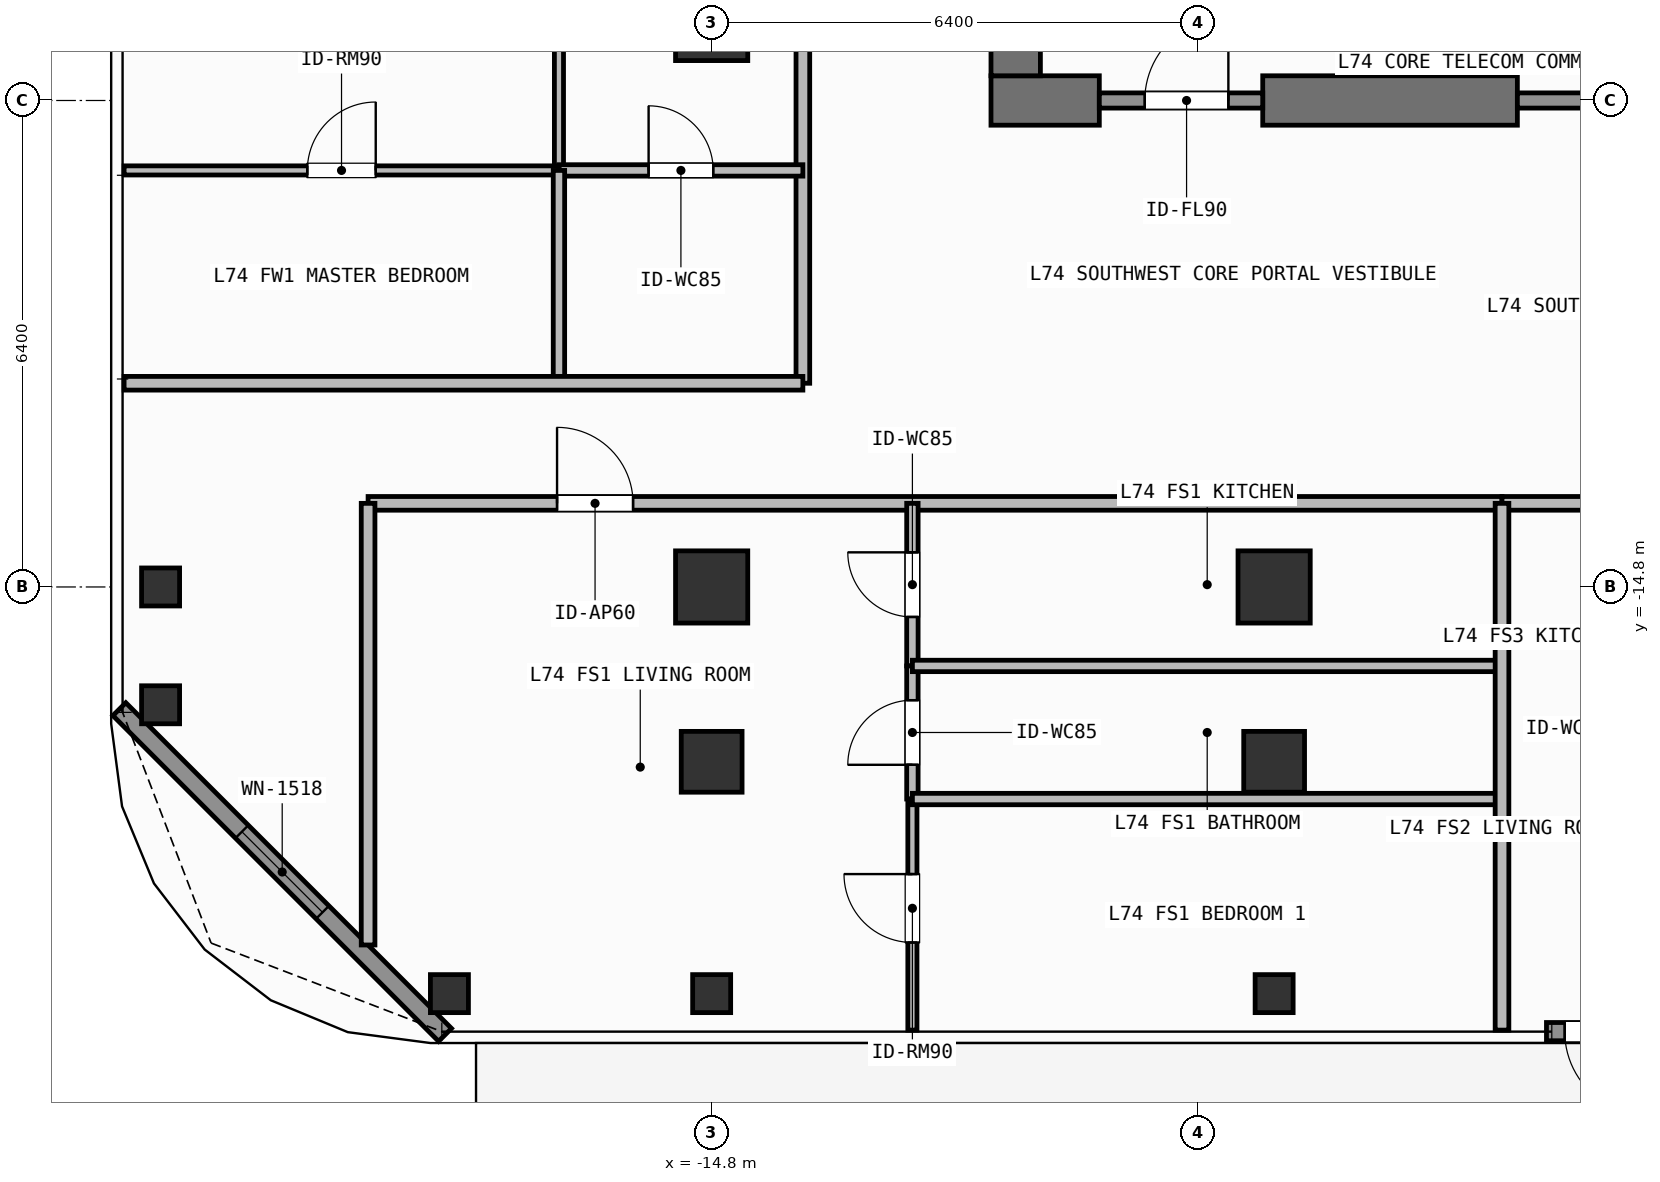
"""IFC4 building model, lengths in metres.
Left out: names, types, materials, properties, quantities, classifications, styles, units other than length and angle.
Written with IfcOpenShell. Run it as: python <this file> out.ifc"""

import sys

from ifc_helpers import new_model, si_unit, direction, frame, frame_2d, origin, origin_2d, place, context, subcontext, project, spatial, rectangle, hollow_rectangle, extrude, element, fill, save


model = new_model("IFC4")
c1 = context("Model", 3, precision=1e-05, world=origin(), true_north=direction((0.0, 1.0)))
c2 = subcontext(c1, "Body", "Model", "MODEL_VIEW")
j1 = project(units=[si_unit("LENGTHUNIT", "METRE"), si_unit("PLANEANGLEUNIT", "RADIAN")], contexts=[c1])
p1 = place(None, origin())
s1 = spatial("IfcSite", under=j1, at=p1, CompositionType="ELEMENT")
p2 = place(p1, origin())
s2 = spatial("IfcBuilding", under=s1, at=p2, CompositionType="ELEMENT")
p3 = place(p2, frame((0.0, 0.0, 301.5)))
s3 = spatial("IfcBuildingStorey", under=s2, at=p3, CompositionType="ELEMENT", Elevation=301.5)
p4 = place(p3, frame((-11.125, -8.4, 0.0), z_axis=(0.0, 0.0, 1.0), x_axis=(1.0, 0.0, 0.0)))
e1 = element("IfcWall", 1, at=p4, inside=s3, PredefinedType="SHEAR", context=c2, shape_type="SweptSolid", body=[
    extrude(rectangle(XDim=1.425, YDim=0.65, at=frame_2d((0.712, 0.0))), origin(), (0.0, 0.0, 1.0), 3.9),
])
p5 = place(p3, frame((-7.55, -8.4, 0.0), z_axis=(0.0, 0.0, 1.0), x_axis=(1.0, 0.0, 0.0)))
e2 = element("IfcWall", 2, at=p5, inside=s3, PredefinedType="SHEAR", context=c2, shape_type="SweptSolid", body=[
    extrude(rectangle(XDim=3.35, YDim=0.65, at=frame_2d((1.675, 0.0))), origin(), (0.0, 0.0, 1.0), 3.9),
])
p6 = place(p3, frame((-10.8, -8.075, 0.0), z_axis=(0.0, 0.0, 1.0), x_axis=(0.0, 1.0, 0.0)))
e3 = element("IfcWall", 3, at=p6, inside=s3, PredefinedType="SHEAR", context=c2, shape_type="SweptSolid", body=[
    extrude(rectangle(XDim=16.15, YDim=0.65, at=frame_2d((8.075, 0.0))), origin(), (0.0, 0.0, 1.0), 3.9),
])
for number, where, z_axis, x_axis in (
    (4, (-14.8, -14.8, 0.0), (0.0, 0.0, 1.0), (1.0, 0.0, 0.0)),
    (5, (-7.4, -14.8, 0.0), (0.0, 0.0, 1.0), (1.0, 0.0, 0.0)),
    (6, (-14.8, -7.4, 0.0), (0.0, 0.0, 1.0), (1.0, 0.0, 0.0)),
):
    element("IfcColumn", number, at=place(p3, frame(where, z_axis=z_axis, x_axis=x_axis)), inside=s3, PredefinedType="COLUMN", context=c2, shape_type="SweptSolid", body=[
        extrude(rectangle(XDim=0.95, YDim=0.95, at=origin_2d()), origin(), (0.0, 0.0, 1.0), 3.9),
    ])
for number, where, z_axis, x_axis in (
    (7, (-14.8, -17.1, 0.0), (0.0, 0.0, 1.0), (1.0, 0.0, 0.0)),
    (8, (-7.4, -17.1, 0.0), (0.0, 0.0, 1.0), (1.0, 0.0, 0.0)),
):
    element("IfcColumn", number, at=place(p3, frame(where, z_axis=z_axis, x_axis=x_axis)), inside=s3, PredefinedType="COLUMN", context=c2, shape_type="SweptSolid", body=[
        extrude(hollow_rectangle(XDim=0.8, YDim=0.8, WallThickness=0.036, at=origin_2d()), origin(), (0.0, 0.0, 1.0), 3.9),
    ])
for number, where, z_axis, x_axis in (
    (9, (-18.25, -20.15, 0.0), (0.0, 0.0, 1.0), (1.0, 0.0, 0.0)),
    (10, (-22.05, -16.35, 0.0), (0.0, 0.0, 1.0), (1.0, 0.0, 0.0)),
    (11, (-14.8, -20.15, 0.0), (0.0, 0.0, 1.0), (1.0, 0.0, 0.0)),
    (12, (-7.4, -20.15, 0.0), (0.0, 0.0, 1.0), (1.0, 0.0, 0.0)),
    (13, (-22.05, -14.8, 0.0), (0.0, 0.0, 1.0), (1.0, 0.0, 0.0)),
):
    element("IfcColumn", number, at=place(p3, frame(where, z_axis=z_axis, x_axis=x_axis)), inside=s3, PredefinedType="COLUMN", context=c2, shape_type="SweptSolid", body=[
        extrude(hollow_rectangle(XDim=0.5, YDim=0.5, WallThickness=0.025, at=origin_2d()), origin(), (0.0, 0.0, 1.0), 3.9),
    ])
p7 = place(p3, frame((-2.237, -20.65, 0.0), z_axis=(0.0, 0.0, 1.0), x_axis=(-1.0, 0.0, 0.0)))
e14 = element("IfcWall", 14, at=p7, inside=s3, PredefinedType="SOLIDWALL", context=c2, shape_type="SweptSolid", body=[
    extrude(rectangle(XDim=1.58, YDim=0.24, at=frame_2d((0.79, 0.0))), origin(), (0.0, 0.0, 1.0), 3.68),
])
p8 = place(p7, frame((0.24, 0.0, 0.0)))
e15 = element("IfcOpeningElement", 15, at=p8, cuts=e14, PredefinedType="OPENING", context=c2, shape_type="SweptSolid", body=[
    extrude(rectangle(XDim=1.1, YDim=2.2, at=frame_2d((0.55, 1.1))), frame((0.0, 0.13, 0.0), z_axis=(0.0, -1.0, 0.0), x_axis=(1.0, 0.0, 0.0)), (0.0, 0.0, 1.0), 0.26),
])
p9 = place(p3, frame((-18.308, -20.692, 0.0), z_axis=(0.0, 0.0, 1.0), x_axis=(-0.707106781187, 0.707106781187, 0.0)))
e16 = element("IfcWall", 16, at=p9, inside=s3, PredefinedType="SOLIDWALL", context=c2, shape_type="SweptSolid", body=[
    extrude(rectangle(XDim=6.059, YDim=0.24, at=frame_2d((3.03, 0.0))), origin(), (0.0, 0.0, 1.0), 3.68),
])
p10 = place(p9, frame((2.28, 0.0, 0.8)))
e17 = element("IfcOpeningElement", 17, at=p10, cuts=e16, PredefinedType="OPENING", context=c2, shape_type="SweptSolid", body=[
    extrude(rectangle(XDim=1.5, YDim=1.85, at=frame_2d((0.75, 0.925))), frame((0.0, 0.13, 0.0), z_axis=(0.0, -1.0, 0.0), x_axis=(1.0, 0.0, 0.0)), (0.0, 0.0, 1.0), 0.26),
])
p11 = place(p3, frame((-9.7, -8.4, 0.0), z_axis=(0.0, 0.0, 1.0), x_axis=(1.0, 0.0, 0.0)))
e18 = element("IfcWall", 18, at=p11, inside=s3, PredefinedType="SOLIDWALL", context=c2, shape_type="SweptSolid", body=[
    extrude(rectangle(XDim=2.15, YDim=0.2, at=frame_2d((1.075, 0.0))), origin(), (0.0, 0.0, 1.0), 2.92),
])
p12 = place(p11, frame((0.598, 0.0, 0.0)))
e19 = element("IfcOpeningElement", 19, at=p12, cuts=e18, PredefinedType="OPENING", context=c2, shape_type="SweptSolid", body=[
    extrude(rectangle(XDim=1.1, YDim=2.15, at=frame_2d((0.55, 1.075))), frame((0.0, 0.11, 0.0), z_axis=(0.0, -1.0, 0.0), x_axis=(1.0, 0.0, 0.0)), (0.0, 0.0, 1.0), 0.22),
])
p13 = place(p3, frame((-19.32, -13.7, 0.0), z_axis=(0.0, 0.0, 1.0), x_axis=(1.0, 0.0, 0.0)))
e20 = element("IfcWall", 20, at=p13, inside=s3, PredefinedType="PARTITIONING", context=c2, shape_type="SweptSolid", body=[
    extrude(rectangle(XDim=14.918, YDim=0.18, at=frame_2d((7.459, 0.0))), origin(), (0.0, 0.0, 1.0), 3.68),
])
p14 = place(p13, frame((2.486, 0.0, 0.0)))
e21 = element("IfcOpeningElement", 21, at=p14, cuts=e20, PredefinedType="OPENING", context=c2, shape_type="SweptSolid", body=[
    extrude(rectangle(XDim=1.0, YDim=2.2, at=frame_2d((0.5, 1.1))), frame((0.0, 0.1, 0.0), z_axis=(0.0, -1.0, 0.0), x_axis=(1.0, 0.0, 0.0)), (0.0, 0.0, 1.0), 0.2),
])
p15 = place(p3, frame((-12.159, -15.839, 0.0), z_axis=(0.0, 0.0, 1.0), x_axis=(0.0, 1.0, 0.0)))
e22 = element("IfcWall", 22, at=p15, inside=s3, PredefinedType="PARTITIONING", context=c2, shape_type="SweptSolid", body=[
    extrude(rectangle(XDim=2.139, YDim=0.15, at=frame_2d((1.07, 0.0))), origin(), (0.0, 0.0, 1.0), 3.68),
])
p16 = place(p15, frame((0.645, 0.0, 0.0)))
e23 = element("IfcOpeningElement", 23, at=p16, cuts=e22, PredefinedType="OPENING", context=c2, shape_type="SweptSolid", body=[
    extrude(rectangle(XDim=0.85, YDim=2.1, at=frame_2d((0.425, 1.05))), frame((0.0, 0.085, 0.0), z_axis=(0.0, -1.0, 0.0), x_axis=(1.0, 0.0, 0.0)), (0.0, 0.0, 1.0), 0.17),
])
p17 = place(p3, frame((-12.159, -17.59, 0.0), z_axis=(0.0, 0.0, 1.0), x_axis=(0.0, 1.0, 0.0)))
e24 = element("IfcWall", 24, at=p17, inside=s3, PredefinedType="PARTITIONING", context=c2, shape_type="SweptSolid", body=[
    extrude(rectangle(XDim=1.751, YDim=0.15, at=frame_2d((0.875, 0.0))), origin(), (0.0, 0.0, 1.0), 3.68),
])
p18 = place(p17, frame((0.45, 0.0, 0.0)))
e25 = element("IfcOpeningElement", 25, at=p18, cuts=e24, PredefinedType="OPENING", context=c2, shape_type="SweptSolid", body=[
    extrude(rectangle(XDim=0.85, YDim=2.1, at=frame_2d((0.425, 1.05))), frame((0.0, 0.085, 0.0), z_axis=(0.0, -1.0, 0.0), x_axis=(1.0, 0.0, 0.0)), (0.0, 0.0, 1.0), 0.17),
])
p19 = place(p3, frame((-12.159, -20.63, 0.0), z_axis=(0.0, 0.0, 1.0), x_axis=(0.0, 1.0, 0.0)))
e26 = element("IfcWall", 26, at=p19, inside=s3, PredefinedType="PARTITIONING", context=c2, shape_type="SweptSolid", body=[
    extrude(rectangle(XDim=3.04, YDim=0.12, at=frame_2d((1.52, 0.0))), origin(), (0.0, 0.0, 1.0), 3.68),
])
p20 = place(p19, frame((1.153, 0.0, 0.0)))
e27 = element("IfcOpeningElement", 27, at=p20, cuts=e26, PredefinedType="OPENING", context=c2, shape_type="SweptSolid", body=[
    extrude(rectangle(XDim=0.9, YDim=2.1, at=frame_2d((0.45, 1.05))), frame((0.0, 0.07, 0.0), z_axis=(0.0, -1.0, 0.0), x_axis=(1.0, 0.0, 0.0)), (0.0, 0.0, 1.0), 0.14),
])
p21 = place(p3, frame((-4.402, -13.7, 0.0), z_axis=(0.0, 0.0, 1.0), x_axis=(1.0, 0.0, 0.0)))
e28 = element("IfcWall", 28, at=p21, inside=s3, PredefinedType="PARTITIONING", context=c2, shape_type="SweptSolid", body=[
    extrude(rectangle(XDim=7.148, YDim=0.18, at=frame_2d((3.574, 0.0))), origin(), (0.0, 0.0, 1.0), 3.68),
])
p22 = place(p21, frame((1.219, 0.0, 0.0)))
e29 = element("IfcOpeningElement", 29, at=p22, cuts=e28, PredefinedType="OPENING", context=c2, shape_type="SweptSolid", body=[
    extrude(rectangle(XDim=1.0, YDim=2.2, at=frame_2d((0.5, 1.1))), frame((0.0, 0.1, 0.0), z_axis=(0.0, -1.0, 0.0), x_axis=(1.0, 0.0, 0.0)), (0.0, 0.0, 1.0), 0.2),
])
p23 = place(p3, frame((-13.6, -12.12, 0.0), z_axis=(0.0, 0.0, 1.0), x_axis=(0.0, 1.0, 0.0)))
e30 = element("IfcWall", 30, at=p23, inside=s3, PredefinedType="PARTITIONING", context=c2, shape_type="SweptSolid", body=[
    extrude(rectangle(XDim=24.24, YDim=0.18, at=frame_2d((12.12, 0.0))), origin(), (0.0, 0.0, 1.0), 3.68),
])
p24 = place(p23, frame((9.829, 0.0, 0.0)))
e31 = element("IfcOpeningElement", 31, at=p24, cuts=e30, PredefinedType="OPENING", context=c2, shape_type="SweptSolid", body=[
    extrude(rectangle(XDim=1.0, YDim=2.2, at=frame_2d((0.5, 1.1))), frame((0.0, 0.1, 0.0), z_axis=(0.0, -1.0, 0.0), x_axis=(1.0, 0.0, 0.0)), (0.0, 0.0, 1.0), 0.2),
])
p25 = place(p3, frame((-16.809, -9.32, 0.0), z_axis=(0.0, 0.0, 1.0), x_axis=(0.0, 1.0, 0.0)))
e32 = element("IfcWall", 32, at=p25, inside=s3, PredefinedType="PARTITIONING", context=c2, shape_type="SweptSolid", body=[
    extrude(rectangle(XDim=14.756, YDim=0.12, at=frame_2d((7.378, 0.0))), origin(), (0.0, 0.0, 1.0), 3.68),
])
p26 = place(p25, frame((6.928, 0.0, 0.0)))
e33 = element("IfcOpeningElement", 33, at=p26, cuts=e32, PredefinedType="OPENING", context=c2, shape_type="SweptSolid", body=[
    extrude(rectangle(XDim=0.9, YDim=2.1, at=frame_2d((0.45, 1.05))), frame((0.0, 0.07, 0.0), z_axis=(0.0, -1.0, 0.0), x_axis=(1.0, 0.0, 0.0)), (0.0, 0.0, 1.0), 0.14),
])
p27 = place(p3, frame((-16.809, -9.32, 0.0), z_axis=(0.0, 0.0, 1.0), x_axis=(1.0, 0.0, 0.0)))
e34 = element("IfcWall", 34, at=p27, inside=s3, PredefinedType="PARTITIONING", context=c2, shape_type="SweptSolid", body=[
    extrude(rectangle(XDim=3.209, YDim=0.15, at=frame_2d((1.604, 0.0))), origin(), (0.0, 0.0, 1.0), 3.68),
])
p28 = place(p27, frame((1.179, 0.0, 0.0)))
e35 = element("IfcOpeningElement", 35, at=p28, cuts=e34, PredefinedType="OPENING", context=c2, shape_type="SweptSolid", body=[
    extrude(rectangle(XDim=0.85, YDim=2.1, at=frame_2d((0.425, 1.05))), frame((0.0, 0.085, 0.0), z_axis=(0.0, -1.0, 0.0), x_axis=(1.0, 0.0, 0.0)), (0.0, 0.0, 1.0), 0.17),
])
p29 = place(p3, frame((-22.53, -9.32, 0.0), z_axis=(0.0, 0.0, 1.0), x_axis=(1.0, 0.0, 0.0)))
e36 = element("IfcWall", 36, at=p29, inside=s3, PredefinedType="PARTITIONING", context=c2, shape_type="SweptSolid", body=[
    extrude(rectangle(XDim=5.721, YDim=0.12, at=frame_2d((2.86, 0.0))), origin(), (0.0, 0.0, 1.0), 3.68),
])
p30 = place(p29, frame((2.41, 0.0, 0.0)))
e37 = element("IfcOpeningElement", 37, at=p30, cuts=e36, PredefinedType="OPENING", context=c2, shape_type="SweptSolid", body=[
    extrude(rectangle(XDim=0.9, YDim=2.1, at=frame_2d((0.45, 1.05))), frame((0.0, 0.07, 0.0), z_axis=(0.0, -1.0, 0.0), x_axis=(1.0, 0.0, 0.0)), (0.0, 0.0, 1.0), 0.14),
])
p31 = place(p3, frame((-4.2, -8.4, 0.0), z_axis=(0.0, 0.0, 1.0), x_axis=(1.0, 0.0, 0.0)))
e38 = element("IfcWall", 38, at=p31, inside=s3, PredefinedType="SOLIDWALL", context=c2, shape_type="SweptSolid", body=[
    extrude(rectangle(XDim=1.58, YDim=0.2, at=frame_2d((0.79, 0.0))), origin(), (0.0, 0.0, 1.0), 2.92),
])
p32 = place(p3, frame((-19.32, -19.51, 0.0), z_axis=(0.0, 0.0, 1.0), x_axis=(0.0, 1.0, 0.0)))
e39 = element("IfcWall", 39, at=p32, inside=s3, PredefinedType="PARTITIONING", context=c2, shape_type="SweptSolid", body=[
    extrude(rectangle(XDim=5.81, YDim=0.18, at=frame_2d((2.905, 0.0))), origin(), (0.0, 0.0, 1.0), 3.68),
])
for number, where, z_axis, x_axis in (
    (40, (-12.159, -15.839, 0.0), (0.0, 0.0, 1.0), (1.0, 0.0, 0.0)),
    (41, (-12.159, -17.59, 0.0), (0.0, 0.0, 1.0), (1.0, 0.0, 0.0)),
):
    element("IfcWall", number, at=place(p3, frame(where, z_axis=z_axis, x_axis=x_axis)), inside=s3, PredefinedType="PARTITIONING", context=c2, shape_type="SweptSolid", body=[
        extrude(rectangle(XDim=7.757, YDim=0.15, at=frame_2d((3.878, 0.0))), origin(), (0.0, 0.0, 1.0), 3.68),
    ])
p33 = place(p3, frame((-4.402, -20.63, 0.0), z_axis=(0.0, 0.0, 1.0), x_axis=(0.0, 1.0, 0.0)))
e42 = element("IfcWall", 42, at=p33, inside=s3, PredefinedType="PARTITIONING", context=c2, shape_type="SweptSolid", body=[
    extrude(rectangle(XDim=6.93, YDim=0.18, at=frame_2d((3.465, 0.0))), origin(), (0.0, 0.0, 1.0), 3.68),
])
p34 = place(p3, frame((-16.809, -12.12, 0.0), z_axis=(0.0, 0.0, 1.0), x_axis=(0.0, 1.0, 0.0)))
e43 = element("IfcWall", 43, at=p34, inside=s3, PredefinedType="PARTITIONING", context=c2, shape_type="SweptSolid", body=[
    extrude(rectangle(XDim=2.8, YDim=0.15, at=frame_2d((1.4, 0.0))), origin(), (0.0, 0.0, 1.0), 3.68),
])
p35 = place(p3, frame((-22.53, -12.12, 0.0), z_axis=(0.0, 0.0, 1.0), x_axis=(1.0, 0.0, 0.0)))
e44 = element("IfcWall", 44, at=p35, inside=s3, PredefinedType="PARTITIONING", context=c2, shape_type="SweptSolid", body=[
    extrude(rectangle(XDim=8.93, YDim=0.18, at=frame_2d((4.465, 0.0))), origin(), (0.0, 0.0, 1.0), 3.68),
])
p36 = place(p8, origin())
e45 = element("IfcDoor", 45, at=p36, inside=s3, OperationType="SINGLE_SWING_LEFT", PredefinedType="DOOR", context=c2, shape_type="SweptSolid", body=[
    extrude(rectangle(XDim=1.1, YDim=2.2, at=frame_2d((0.55, 1.1))), frame((0.0, 0.025, 0.0), z_axis=(0.0, -1.0, 0.0), x_axis=(1.0, 0.0, 0.0)), (0.0, 0.0, 1.0), 0.05),
])
fill(e15, e45)
p37 = place(p10, origin())
e46 = element("IfcWindow", 46, at=p37, inside=s3, PartitioningType="SINGLE_PANEL", PredefinedType="WINDOW", context=c2, shape_type="SweptSolid", body=[
    extrude(rectangle(XDim=1.5, YDim=1.85, at=frame_2d((0.75, 0.925))), frame((0.0, 0.03, 0.0), z_axis=(0.0, -1.0, 0.0), x_axis=(1.0, 0.0, 0.0)), (0.0, 0.0, 1.0), 0.06),
])
fill(e17, e46)
p38 = place(p12, origin())
e47 = element("IfcDoor", 47, at=p38, inside=s3, OperationType="SINGLE_SWING_RIGHT", PredefinedType="DOOR", context=c2, shape_type="SweptSolid", body=[
    extrude(rectangle(XDim=1.1, YDim=2.15, at=frame_2d((0.55, 1.075))), frame((0.0, 0.025, 0.0), z_axis=(0.0, -1.0, 0.0), x_axis=(1.0, 0.0, 0.0)), (0.0, 0.0, 1.0), 0.05),
])
fill(e19, e47)
p39 = place(p14, origin())
e48 = element("IfcDoor", 48, at=p39, inside=s3, OperationType="SINGLE_SWING_LEFT", PredefinedType="DOOR", context=c2, shape_type="SweptSolid", body=[
    extrude(rectangle(XDim=1.0, YDim=2.2, at=frame_2d((0.5, 1.1))), frame((0.0, 0.025, 0.0), z_axis=(0.0, -1.0, 0.0), x_axis=(1.0, 0.0, 0.0)), (0.0, 0.0, 1.0), 0.05),
])
fill(e21, e48)
p40 = place(p16, origin())
e49 = element("IfcDoor", 49, at=p40, inside=s3, OperationType="SINGLE_SWING_RIGHT", PredefinedType="DOOR", context=c2, shape_type="SweptSolid", body=[
    extrude(rectangle(XDim=0.85, YDim=2.1, at=frame_2d((0.425, 1.05))), frame((0.0, 0.025, 0.0), z_axis=(0.0, -1.0, 0.0), x_axis=(1.0, 0.0, 0.0)), (0.0, 0.0, 1.0), 0.05),
])
fill(e23, e49)
p41 = place(p18, origin())
e50 = element("IfcDoor", 50, at=p41, inside=s3, OperationType="SINGLE_SWING_LEFT", PredefinedType="DOOR", context=c2, shape_type="SweptSolid", body=[
    extrude(rectangle(XDim=0.85, YDim=2.1, at=frame_2d((0.425, 1.05))), frame((0.0, 0.025, 0.0), z_axis=(0.0, -1.0, 0.0), x_axis=(1.0, 0.0, 0.0)), (0.0, 0.0, 1.0), 0.05),
])
fill(e25, e50)
p42 = place(p20, origin())
e51 = element("IfcDoor", 51, at=p42, inside=s3, OperationType="SINGLE_SWING_RIGHT", PredefinedType="DOOR", context=c2, shape_type="SweptSolid", body=[
    extrude(rectangle(XDim=0.9, YDim=2.1, at=frame_2d((0.45, 1.05))), frame((0.0, 0.025, 0.0), z_axis=(0.0, -1.0, 0.0), x_axis=(1.0, 0.0, 0.0)), (0.0, 0.0, 1.0), 0.05),
])
fill(e27, e51)
p43 = place(p28, origin())
e52 = element("IfcDoor", 52, at=p43, inside=s3, OperationType="SINGLE_SWING_LEFT", PredefinedType="DOOR", context=c2, shape_type="SweptSolid", body=[
    extrude(rectangle(XDim=0.85, YDim=2.1, at=frame_2d((0.425, 1.05))), frame((0.0, 0.025, 0.0), z_axis=(0.0, -1.0, 0.0), x_axis=(1.0, 0.0, 0.0)), (0.0, 0.0, 1.0), 0.05),
])
fill(e35, e52)
p44 = place(p30, origin())
e53 = element("IfcDoor", 53, at=p44, inside=s3, OperationType="SINGLE_SWING_RIGHT", PredefinedType="DOOR", context=c2, shape_type="SweptSolid", body=[
    extrude(rectangle(XDim=0.9, YDim=2.1, at=frame_2d((0.45, 1.05))), frame((0.0, 0.025, 0.0), z_axis=(0.0, -1.0, 0.0), x_axis=(1.0, 0.0, 0.0)), (0.0, 0.0, 1.0), 0.05),
])
fill(e37, e53)
save(model, sys.argv[1])
